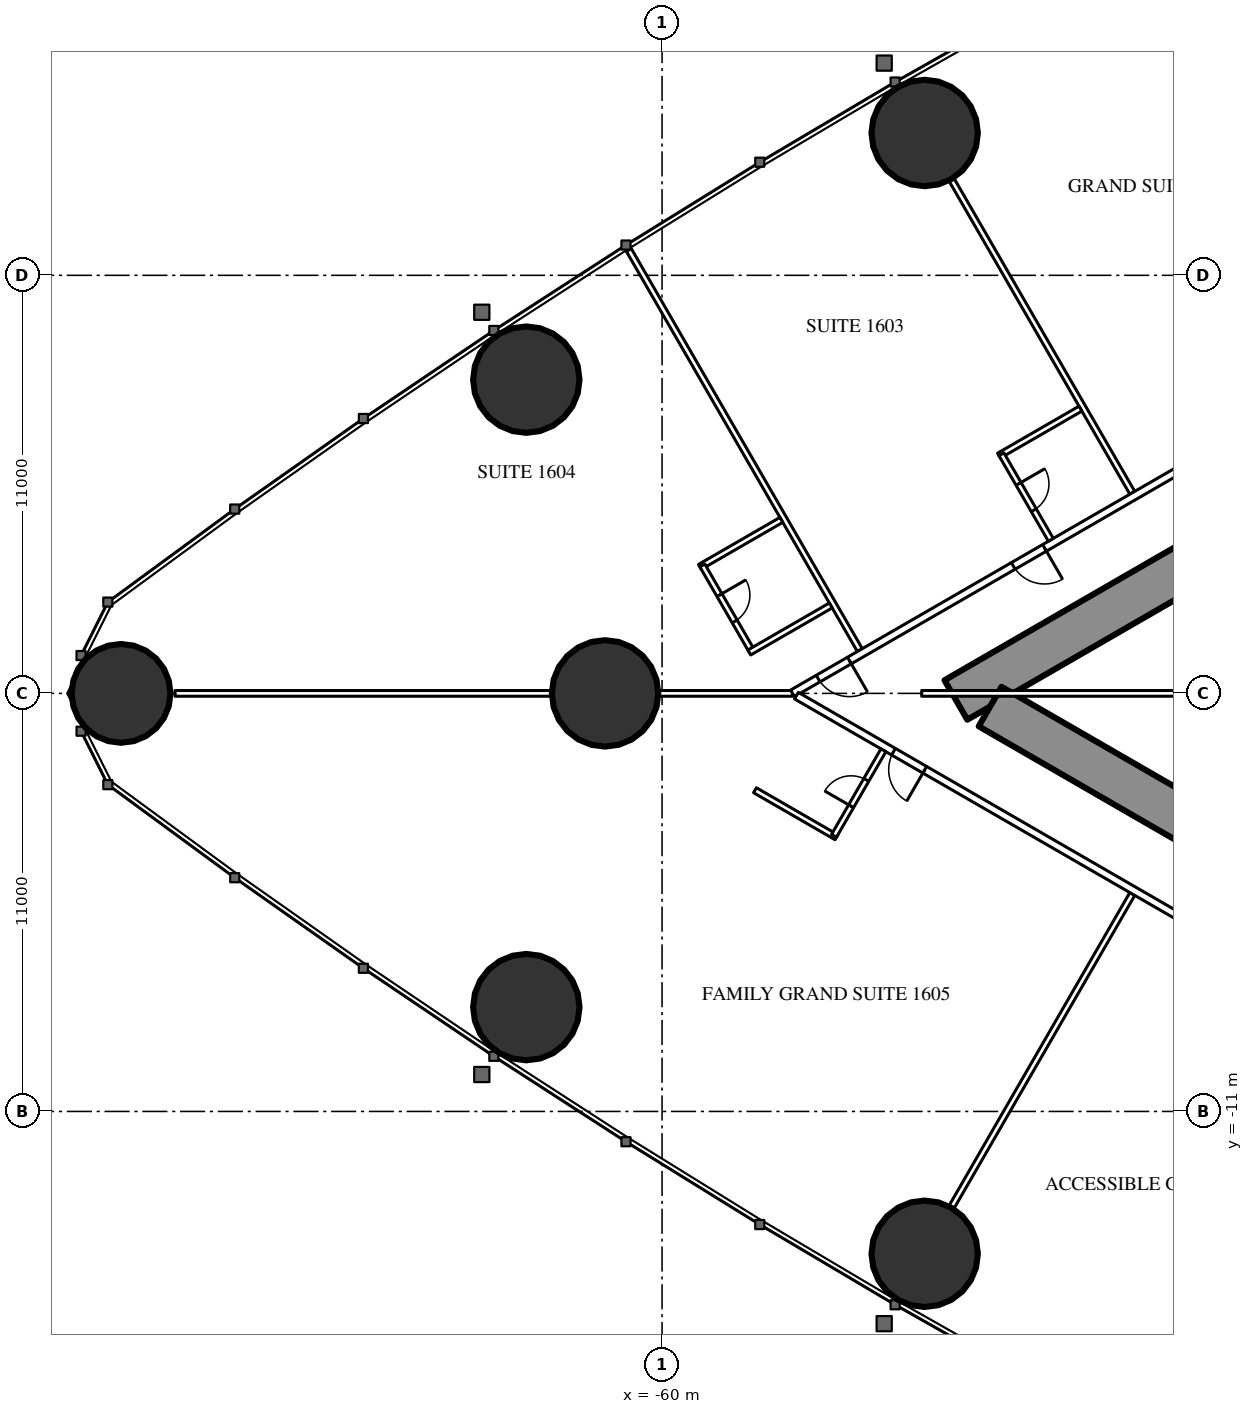
"""IFC4 building model, lengths in metres.
Left out: names, types, materials, properties, quantities, classifications, styles, units other than length and angle.
Written with IfcOpenShell. Run it as: python <this file> out.ifc"""

import sys

from ifc_helpers import new_model, si_unit, direction, frame, frame_2d, origin, origin_2d, place, context, subcontext, project, spatial, rectangle, hollow_circle, extrude, element, fill, save


model = new_model("IFC4")
c1 = context("Model", 3, precision=1e-05, world=origin(), true_north=direction((0.0, 1.0)))
c2 = subcontext(c1, "Body", "Model", "MODEL_VIEW")
j1 = project(units=[si_unit("LENGTHUNIT", "METRE"), si_unit("PLANEANGLEUNIT", "RADIAN")], contexts=[c1])
p1 = place(None, origin())
s1 = spatial("IfcSite", under=j1, at=p1, CompositionType="ELEMENT")
p2 = place(p1, origin())
s2 = spatial("IfcBuilding", under=s1, at=p2, CompositionType="ELEMENT")
p3 = place(p2, frame((0.0, 0.0, 63.5)))
s3 = spatial("IfcBuildingStorey", under=s2, at=p3, CompositionType="ELEMENT", Elevation=63.5)
p4 = place(p3, frame((-74.235, 0.0, 0.0), z_axis=(0.0, 0.0, 1.0), x_axis=(1.0, 0.0, 0.0)))
e1 = element("IfcColumn", 1, at=p4, inside=s3, PredefinedType="COLUMN", context=c2, shape_type="SweptSolid", body=[
    extrude(hollow_circle(Radius=1.3, WallThickness=0.1, at=origin_2d()), origin(), (0.0, 0.0, 1.0), 3.5),
])
for number, where, z_axis, x_axis in (
    (2, (-63.572, -8.255, 0.0), (0.0, 0.0, 1.0), (1.0, 0.0, 0.0)),
    (3, (-53.09, -14.745, 0.0), (0.0, 0.0, 1.0), (1.0, 0.0, 0.0)),
    (4, (-53.09, 14.745, 0.0), (0.0, 0.0, 1.0), (1.0, 0.0, 0.0)),
    (5, (-63.572, 8.255, 0.0), (0.0, 0.0, 1.0), (1.0, 0.0, 0.0)),
):
    element("IfcColumn", number, at=place(p3, frame(where, z_axis=z_axis, x_axis=x_axis)), inside=s3, PredefinedType="COLUMN", context=c2, shape_type="SweptSolid", body=[
        extrude(hollow_circle(Radius=1.4, WallThickness=0.12, at=origin_2d()), origin(), (0.0, 0.0, 1.0), 3.5),
    ])
p5 = place(p3, frame((-61.5, 0.0, 0.0), z_axis=(0.0, 0.0, 1.0), x_axis=(1.0, 0.0, 0.0)))
e6 = element("IfcColumn", 6, at=p5, inside=s3, PredefinedType="COLUMN", context=c2, shape_type="SweptSolid", body=[
    extrude(hollow_circle(Radius=1.4, WallThickness=0.1, at=origin_2d()), origin(), (0.0, 0.0, 1.0), 3.5),
])
p6 = place(p3, frame((-27.2, 14.3, 0.0), z_axis=(0.0, 0.0, 1.0), x_axis=(-0.866026593062, -0.499997940104, 0.0)))
e7 = element("IfcWall", 7, at=p6, inside=s3, PredefinedType="SHEAR", context=c2, shape_type="SweptSolid", body=[
    extrude(rectangle(XDim=28.946, YDim=1.2, at=frame_2d((14.473, 0.0))), origin(), (0.0, 0.0, 1.0), 3.5),
])
p7 = place(p6, frame((4.6, 0.0, 0.0)))
e8 = element("IfcOpeningElement", 8, at=p7, cuts=e7, PredefinedType="OPENING", context=c2, shape_type="SweptSolid", body=[
    extrude(rectangle(XDim=1.0, YDim=2.2, at=frame_2d((0.5, 1.1))), frame((0.0, 0.61, 0.0), z_axis=(0.0, -1.0, 0.0), x_axis=(1.0, 0.0, 0.0)), (0.0, 0.0, 1.0), 1.22),
])
p8 = place(p6, frame((13.395, 0.0, 0.0)))
e9 = element("IfcOpeningElement", 9, at=p8, cuts=e7, PredefinedType="OPENING", context=c2, shape_type="SweptSolid", body=[
    extrude(rectangle(XDim=1.8, YDim=2.2, at=frame_2d((0.9, 1.1))), frame((0.0, 0.61, 0.0), z_axis=(0.0, -1.0, 0.0), x_axis=(1.0, 0.0, 0.0)), (0.0, 0.0, 1.0), 1.22),
])
p9 = place(p3, frame((-27.2, -14.3, 0.0), z_axis=(0.0, 0.0, 1.0), x_axis=(-0.866024021859, 0.500002393557, 0.0)))
e10 = element("IfcWall", 10, at=p9, inside=s3, PredefinedType="SHEAR", context=c2, shape_type="SweptSolid", body=[
    extrude(rectangle(XDim=27.907, YDim=1.2, at=frame_2d((13.954, 0.0))), origin(), (0.0, 0.0, 1.0), 3.5),
])
p10 = place(p9, frame((4.6, 0.0, 0.0)))
e11 = element("IfcOpeningElement", 11, at=p10, cuts=e10, PredefinedType="OPENING", context=c2, shape_type="SweptSolid", body=[
    extrude(rectangle(XDim=1.0, YDim=2.2, at=frame_2d((0.5, 1.1))), frame((0.0, 0.61, 0.0), z_axis=(0.0, -1.0, 0.0), x_axis=(1.0, 0.0, 0.0)), (0.0, 0.0, 1.0), 1.22),
])
p11 = place(p9, frame((13.395, 0.0, 0.0)))
e12 = element("IfcOpeningElement", 12, at=p11, cuts=e10, PredefinedType="OPENING", context=c2, shape_type="SweptSolid", body=[
    extrude(rectangle(XDim=1.8, YDim=2.2, at=frame_2d((0.9, 1.1))), frame((0.0, 0.61, 0.0), z_axis=(0.0, -1.0, 0.0), x_axis=(1.0, 0.0, 0.0)), (0.0, 0.0, 1.0), 1.22),
])
p12 = place(p3, frame((-47.627, 5.278, 0.0), z_axis=(0.0, 0.0, 1.0), x_axis=(-0.500009844318, 0.86601972009, 0.0)))
e13 = element("IfcWall", 13, at=p12, inside=s3, PredefinedType="PARTITIONING", context=c2, shape_type="SweptSolid", body=[
    extrude(rectangle(XDim=9.51, YDim=0.15, at=frame_2d((4.755, 0.0))), origin(), (0.0, 0.0, 1.0), 2.25),
])
p13 = place(p3, frame((-54.796, 1.139, 0.0), z_axis=(0.0, 0.0, 1.0), x_axis=(-0.499998860433, 0.866026061713, 0.0)))
e14 = element("IfcWall", 14, at=p13, inside=s3, PredefinedType="PARTITIONING", context=c2, shape_type="SweptSolid", body=[
    extrude(rectangle(XDim=12.157, YDim=0.15, at=frame_2d((6.078, 0.0))), origin(), (0.0, 0.0, 1.0), 3.25),
])
p14 = place(p3, frame((-47.627, -5.278, 0.0), z_axis=(0.0, 0.0, 1.0), x_axis=(-0.500009844318, -0.86601972009, 0.0)))
e15 = element("IfcWall", 15, at=p14, inside=s3, PredefinedType="PARTITIONING", context=c2, shape_type="SweptSolid", body=[
    extrude(rectangle(XDim=9.51, YDim=0.15, at=frame_2d((4.755, 0.0))), origin(), (0.0, 0.0, 1.0), 2.25),
])
p15 = place(p3, frame((-56.568, 0.0, 0.0), z_axis=(0.0, 0.0, 1.0), x_axis=(-1.0, 0.0, 0.0)))
e16 = element("IfcWall", 16, at=p15, inside=s3, PredefinedType="PARTITIONING", context=c2, shape_type="SweptSolid", body=[
    extrude(rectangle(XDim=16.247, YDim=0.15, at=frame_2d((8.124, 0.0))), origin(), (0.0, 0.0, 1.0), 2.25),
])
p16 = place(p3, frame((-37.7, 10.894, 0.0), z_axis=(0.0, 0.0, 1.0), x_axis=(-0.866027905338, -0.499995667157, 0.0)))
e17 = element("IfcWall", 17, at=p16, inside=s3, PredefinedType="PARTITIONING", context=c2, shape_type="SweptSolid", body=[
    extrude(rectangle(XDim=21.787, YDim=0.2, at=frame_2d((10.894, 0.0))), origin(), (0.0, 0.0, 1.0), 3.25),
])
p17 = place(p16, frame((14.13, 0.0, 0.0)))
e18 = element("IfcOpeningElement", 18, at=p17, cuts=e17, PredefinedType="OPENING", context=c2, shape_type="SweptSolid", body=[
    extrude(rectangle(XDim=0.95, YDim=2.2, at=frame_2d((0.475, 1.1))), frame((0.0, 0.11, 0.0), z_axis=(0.0, -1.0, 0.0), x_axis=(1.0, 0.0, 0.0)), (0.0, 0.0, 1.0), 0.22),
])
p18 = place(p16, frame((20.058, 0.0, 0.0)))
e19 = element("IfcOpeningElement", 19, at=p18, cuts=e17, PredefinedType="OPENING", context=c2, shape_type="SweptSolid", body=[
    extrude(rectangle(XDim=0.95, YDim=2.2, at=frame_2d((0.475, 1.1))), frame((0.0, 0.11, 0.0), z_axis=(0.0, -1.0, 0.0), x_axis=(1.0, 0.0, 0.0)), (0.0, 0.0, 1.0), 0.22),
])
p19 = place(p16, frame((0.6, 0.0, 0.0)))
e20 = element("IfcOpeningElement", 20, at=p19, cuts=e17, PredefinedType="OPENING", context=c2, shape_type="SweptSolid", body=[
    extrude(rectangle(XDim=0.95, YDim=2.2, at=frame_2d((0.475, 1.1))), frame((0.0, 0.11, 0.0), z_axis=(0.0, -1.0, 0.0), x_axis=(1.0, 0.0, 0.0)), (0.0, 0.0, 1.0), 0.22),
])
p20 = place(p3, frame((-36.92, -11.344, 0.0), z_axis=(0.0, 0.0, 1.0), x_axis=(-0.866028313256, 0.499994960614, 0.0)))
e21 = element("IfcWall", 21, at=p20, inside=s3, PredefinedType="PARTITIONING", context=c2, shape_type="SweptSolid", body=[
    extrude(rectangle(XDim=22.568, YDim=0.2, at=frame_2d((11.284, 0.0))), origin(), (0.0, 0.0, 1.0), 3.25),
])
p21 = place(p20, frame((18.668, 0.0, 0.0)))
e22 = element("IfcOpeningElement", 22, at=p21, cuts=e21, PredefinedType="OPENING", context=c2, shape_type="SweptSolid", body=[
    extrude(rectangle(XDim=0.95, YDim=2.2, at=frame_2d((0.475, 1.1))), frame((0.0, 0.11, 0.0), z_axis=(0.0, -1.0, 0.0), x_axis=(1.0, 0.0, 0.0)), (0.0, 0.0, 1.0), 0.22),
])
p22 = place(p20, frame((3.35, 0.0, 0.0)))
e23 = element("IfcOpeningElement", 23, at=p22, cuts=e21, PredefinedType="OPENING", context=c2, shape_type="SweptSolid", body=[
    extrude(rectangle(XDim=1.0, YDim=2.2, at=frame_2d((0.5, 1.1))), frame((0.0, 0.11, 0.0), z_axis=(0.0, -1.0, 0.0), x_axis=(1.0, 0.0, 0.0)), (0.0, 0.0, 1.0), 0.22),
])
p23 = place(p3, frame((-48.992, 7.492, 0.0), z_axis=(0.0, 0.0, 1.0), x_axis=(-0.866031185235, -0.4999899861, 0.0)))
e24 = element("IfcWall", 24, at=p23, inside=s3, PredefinedType="PARTITIONING", context=c2, shape_type="SweptSolid", body=[
    extrude(rectangle(XDim=2.475, YDim=0.15, at=frame_2d((1.238, 0.0))), origin(), (0.0, 0.0, 1.0), 3.25),
])
p24 = place(p3, frame((-49.77, 4.04, 0.0), z_axis=(0.0, 0.0, 1.0), x_axis=(-0.500006934395, 0.866021400173, 0.0)))
e25 = element("IfcWall", 25, at=p24, inside=s3, PredefinedType="PARTITIONING", context=c2, shape_type="SweptSolid", body=[
    extrude(rectangle(XDim=2.6, YDim=0.15, at=frame_2d((1.3, 0.0))), origin(), (0.0, 0.0, 1.0), 3.25),
])
p25 = place(p24, frame((0.9, 0.0, 0.0)))
e26 = element("IfcOpeningElement", 26, at=p25, cuts=e25, PredefinedType="OPENING", context=c2, shape_type="SweptSolid", body=[
    extrude(rectangle(XDim=0.8, YDim=2.2, at=frame_2d((0.4, 1.1))), frame((0.0, 0.085, 0.0), z_axis=(0.0, -1.0, 0.0), x_axis=(1.0, 0.0, 0.0)), (0.0, 0.0, 1.0), 0.17),
])
p26 = place(p3, frame((-56.861, 4.565, 0.0), z_axis=(0.0, 0.0, 1.0), x_axis=(-0.86604923931, -0.499958713387, 0.0)))
e27 = element("IfcWall", 27, at=p26, inside=s3, PredefinedType="PARTITIONING", context=c2, shape_type="SweptSolid", body=[
    extrude(rectangle(XDim=2.475, YDim=0.15, at=frame_2d((1.237, 0.0))), origin(), (0.0, 0.0, 1.0), 3.25),
])
p27 = place(p3, frame((-57.639, 1.114, 0.0), z_axis=(0.0, 0.0, 1.0), x_axis=(-0.500006934395, 0.866021400173, 0.0)))
e28 = element("IfcWall", 28, at=p27, inside=s3, PredefinedType="PARTITIONING", context=c2, shape_type="SweptSolid", body=[
    extrude(rectangle(XDim=2.6, YDim=0.15, at=frame_2d((1.3, 0.0))), origin(), (0.0, 0.0, 1.0), 3.25),
])
p28 = place(p27, frame((0.9, 0.0, 0.0)))
e29 = element("IfcOpeningElement", 29, at=p28, cuts=e28, PredefinedType="OPENING", context=c2, shape_type="SweptSolid", body=[
    extrude(rectangle(XDim=0.8, YDim=2.2, at=frame_2d((0.4, 1.1))), frame((0.0, 0.085, 0.0), z_axis=(0.0, -1.0, 0.0), x_axis=(1.0, 0.0, 0.0)), (0.0, 0.0, 1.0), 0.17),
])
for number, where, z_axis, x_axis in (
    (30, (-55.561, 2.313, 0.0), (0.0, 0.0, 1.0), (-0.866, -0.5, 0.0)),
    (31, (-55.411, -3.786, 0.0), (0.0, 0.0, 1.0), (-0.866, 0.5, 0.0)),
):
    element("IfcWall", number, at=place(p3, frame(where, z_axis=z_axis, x_axis=x_axis)), inside=s3, PredefinedType="PARTITIONING", context=c2, shape_type="SweptSolid", body=[
        extrude(rectangle(XDim=2.475, YDim=0.15, at=frame_2d((1.237, 0.0))), origin(), (0.0, 0.0, 1.0), 3.25),
    ])
p29 = place(p3, frame((-54.176, -1.497, 0.0), z_axis=(0.0, 0.0, 1.0), x_axis=(-0.500006934395, -0.866021400173, 0.0)))
e32 = element("IfcWall", 32, at=p29, inside=s3, PredefinedType="PARTITIONING", context=c2, shape_type="SweptSolid", body=[
    extrude(rectangle(XDim=2.6, YDim=0.15, at=frame_2d((1.3, 0.0))), origin(), (0.0, 0.0, 1.0), 3.25),
])
p30 = place(p29, frame((0.9, 0.0, 0.0)))
e33 = element("IfcOpeningElement", 33, at=p30, cuts=e32, PredefinedType="OPENING", context=c2, shape_type="SweptSolid", body=[
    extrude(rectangle(XDim=0.8, YDim=2.2, at=frame_2d((0.4, 1.1))), frame((0.0, 0.085, 0.0), z_axis=(0.0, -1.0, 0.0), x_axis=(1.0, 0.0, 0.0)), (0.0, 0.0, 1.0), 0.17),
])
p31 = place(p3, frame((-44.575, 0.0, 0.0), z_axis=(0.0, 0.0, 1.0), x_axis=(-1.0, 0.0, 0.0)))
e34 = element("IfcWall", 34, at=p31, inside=s3, PredefinedType="PARTITIONING", context=c2, shape_type="SweptSolid", body=[
    extrude(rectangle(XDim=8.593, YDim=0.15, at=frame_2d((4.297, 0.0))), origin(), (0.0, 0.0, 1.0), 2.25),
])
p32 = place(p25, origin())
e35 = element("IfcDoor", 35, at=p32, inside=s3, OperationType="SINGLE_SWING_RIGHT", PredefinedType="DOOR", context=c2, shape_type="SweptSolid", body=[
    extrude(rectangle(XDim=0.8, YDim=2.2, at=frame_2d((0.4, 1.1))), frame((0.0, 0.025, 0.0), z_axis=(0.0, -1.0, 0.0), x_axis=(1.0, 0.0, 0.0)), (0.0, 0.0, 1.0), 0.05),
])
fill(e26, e35)
p33 = place(p17, origin())
e36 = element("IfcDoor", 36, at=p33, inside=s3, OperationType="SINGLE_SWING_LEFT", PredefinedType="DOOR", context=c2, shape_type="SweptSolid", body=[
    extrude(rectangle(XDim=0.95, YDim=2.2, at=frame_2d((0.475, 1.1))), frame((0.0, 0.025, 0.0), z_axis=(0.0, -1.0, 0.0), x_axis=(1.0, 0.0, 0.0)), (0.0, 0.0, 1.0), 0.05),
])
fill(e18, e36)
p34 = place(p28, origin())
e37 = element("IfcDoor", 37, at=p34, inside=s3, OperationType="SINGLE_SWING_RIGHT", PredefinedType="DOOR", context=c2, shape_type="SweptSolid", body=[
    extrude(rectangle(XDim=0.8, YDim=2.2, at=frame_2d((0.4, 1.1))), frame((0.0, 0.025, 0.0), z_axis=(0.0, -1.0, 0.0), x_axis=(1.0, 0.0, 0.0)), (0.0, 0.0, 1.0), 0.05),
])
fill(e29, e37)
p35 = place(p18, origin())
e38 = element("IfcDoor", 38, at=p35, inside=s3, OperationType="SINGLE_SWING_LEFT", PredefinedType="DOOR", context=c2, shape_type="SweptSolid", body=[
    extrude(rectangle(XDim=0.95, YDim=2.2, at=frame_2d((0.475, 1.1))), frame((0.0, 0.025, 0.0), z_axis=(0.0, -1.0, 0.0), x_axis=(1.0, 0.0, 0.0)), (0.0, 0.0, 1.0), 0.05),
])
fill(e19, e38)
p36 = place(p30, origin())
e39 = element("IfcDoor", 39, at=p36, inside=s3, OperationType="SINGLE_SWING_RIGHT", PredefinedType="DOOR", context=c2, shape_type="SweptSolid", body=[
    extrude(rectangle(XDim=0.8, YDim=2.2, at=frame_2d((0.4, 1.1))), frame((0.0, 0.025, 0.0), z_axis=(0.0, -1.0, 0.0), x_axis=(1.0, 0.0, 0.0)), (0.0, 0.0, 1.0), 0.05),
])
fill(e33, e39)
p37 = place(p21, origin())
e40 = element("IfcDoor", 40, at=p37, inside=s3, OperationType="SINGLE_SWING_LEFT", PredefinedType="DOOR", context=c2, shape_type="SweptSolid", body=[
    extrude(rectangle(XDim=0.95, YDim=2.2, at=frame_2d((0.475, 1.1))), frame((0.0, 0.025, 0.0), z_axis=(0.0, -1.0, 0.0), x_axis=(1.0, 0.0, 0.0)), (0.0, 0.0, 1.0), 0.05),
])
fill(e22, e40)
save(model, sys.argv[1])
